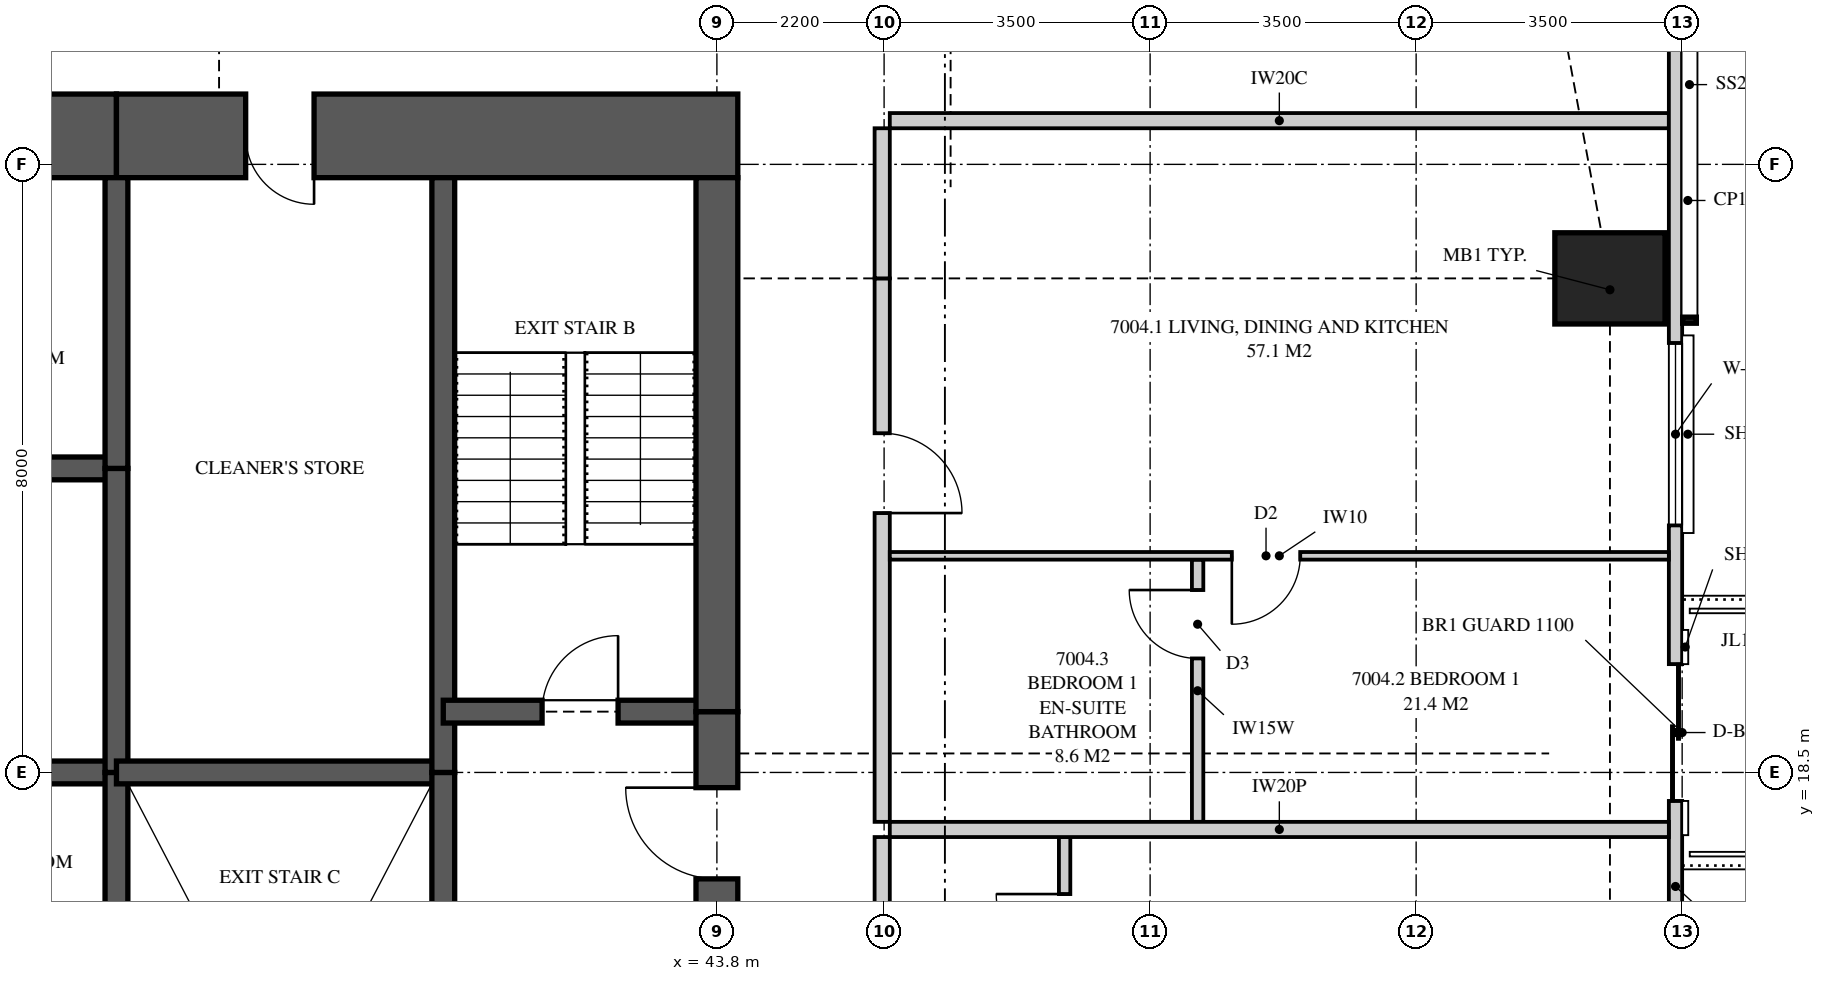
"""IFC4 building model, lengths in metres.
Left out: names, types, materials, properties, quantities, classifications, styles, units other than length and angle.
Written with IfcOpenShell. Run it as: python <this file> out.ifc"""

import sys

from ifc_helpers import new_model, si_unit, direction, frame, frame_2d, origin, origin_2d, place, context, subcontext, project, spatial, polyline, rectangle, outline, extrude, element, fill, save


model = new_model("IFC4")
c1 = context("Model", 3, precision=1e-05, world=origin(), true_north=direction((0.0, 1.0)))
c2 = subcontext(c1, "Body", "Model", "MODEL_VIEW")
j1 = project(units=[si_unit("LENGTHUNIT", "METRE"), si_unit("PLANEANGLEUNIT", "RADIAN")], contexts=[c1])
p1 = place(None, origin())
s1 = spatial("IfcSite", under=j1, at=p1, CompositionType="ELEMENT")
p2 = place(p1, origin())
s2 = spatial("IfcBuilding", under=s1, at=p2, CompositionType="ELEMENT")
p3 = place(p2, frame((0.0, 0.0, 256.45)))
s3 = spatial("IfcBuildingStorey", under=s2, at=p3, CompositionType="ELEMENT", Elevation=256.45)
p4 = place(p3, frame((55.55, 25.0, 0.0), z_axis=(0.0, 0.0, 1.0), x_axis=(1.0, 0.0, 0.0)))
e1 = element("IfcColumn", 1, at=p4, inside=s3, PredefinedType="COLUMN", context=c2, shape_type="SweptSolid", body=[
    extrude(rectangle(XDim=1.45, YDim=1.2, at=origin_2d()), origin(), (0.0, 0.0, 1.0), 3.5),
])
p5 = place(p3, frame((44.075, 26.875, 0.0), z_axis=(0.0, 0.0, 1.0), x_axis=(-1.0, 0.0, 0.0)))
e2 = element("IfcWall", 2, at=p5, inside=s3, PredefinedType="SHEAR", context=c2, shape_type="SweptSolid", body=[
    extrude(rectangle(XDim=8.175, YDim=1.1, at=frame_2d((4.087, 0.0))), origin(), (0.0, 0.0, 1.0), 3.5),
])
p6 = place(p5, frame((5.575, 0.0, 0.0)))
e3 = element("IfcOpeningElement", 3, at=p6, cuts=e2, PredefinedType="OPENING", context=c2, shape_type="SweptSolid", body=[
    extrude(rectangle(XDim=0.9, YDim=2.1, at=frame_2d((0.45, 1.05))), frame((0.0, 0.56, 0.0), z_axis=(0.0, -1.0, 0.0), x_axis=(1.0, 0.0, 0.0)), (0.0, 0.0, 1.0), 1.12),
])
p7 = place(p3, frame((35.9, 26.875, 0.0), z_axis=(0.0, 0.0, 1.0), x_axis=(-1.0, 0.0, 0.0)))
e4 = element("IfcWall", 4, at=p7, inside=s3, PredefinedType="SHEAR", context=c2, shape_type="SweptSolid", body=[
    extrude(rectangle(XDim=4.3, YDim=1.1, at=frame_2d((2.15, 0.0))), origin(), (0.0, 0.0, 1.0), 3.5),
])
p8 = place(p3, frame((43.8, 13.0, 0.0), z_axis=(0.0, 0.0, 1.0), x_axis=(0.0, 1.0, 0.0)))
e5 = element("IfcWall", 5, at=p8, inside=s3, PredefinedType="SHEAR", context=c2, shape_type="SweptSolid", body=[
    extrude(rectangle(XDim=6.3, YDim=0.55, at=frame_2d((3.15, 0.0))), origin(), (0.0, 0.0, 1.0), 3.5),
])
p9 = place(p8, frame((4.1, 0.0, 0.0)))
e6 = element("IfcOpeningElement", 6, at=p9, cuts=e5, PredefinedType="OPENING", context=c2, shape_type="SweptSolid", body=[
    extrude(rectangle(XDim=1.2, YDim=2.2, at=frame_2d((0.6, 1.1))), frame((0.0, 0.285, 0.0), z_axis=(0.0, -1.0, 0.0), x_axis=(1.0, 0.0, 0.0)), (0.0, 0.0, 1.0), 0.57),
])
p10 = place(p3, frame((43.8, 19.3, 0.0), z_axis=(0.0, 0.0, 1.0), x_axis=(0.0, 1.0, 0.0)))
e7 = element("IfcWall", 7, at=p10, inside=s3, PredefinedType="SHEAR", context=c2, shape_type="SweptSolid", body=[
    extrude(rectangle(XDim=7.025, YDim=0.55, at=frame_2d((3.512, 0.0))), origin(), (0.0, 0.0, 1.0), 3.5),
])
for number, where, z_axis, x_axis in (
    (8, (35.9, 14.5, 0.0), (0.0, 0.0, 1.0), (0.0, 1.0, 0.0)),
    (9, (35.9, 18.5, 0.0), (0.0, 0.0, 1.0), (0.0, 1.0, 0.0)),
):
    element("IfcWall", number, at=place(p3, frame(where, z_axis=z_axis, x_axis=x_axis)), inside=s3, PredefinedType="SHEAR", context=c2, shape_type="SweptSolid", body=[
        extrude(rectangle(XDim=4.0, YDim=0.3, at=frame_2d((2.0, 0.0))), origin(), (0.0, 0.0, 1.0), 3.5),
    ])
p11 = place(p3, frame((35.9, 22.5, 0.0), z_axis=(0.0, 0.0, 1.0), x_axis=(0.0, 1.0, 0.0)))
e10 = element("IfcWall", 10, at=p11, inside=s3, PredefinedType="SHEAR", context=c2, shape_type="SweptSolid", body=[
    extrude(rectangle(XDim=3.825, YDim=0.3, at=frame_2d((1.913, 0.0))), origin(), (0.0, 0.0, 1.0), 3.5),
])
p12 = place(p3, frame((40.2, 13.7, 0.0), z_axis=(0.0, 0.0, 1.0), x_axis=(0.0, 1.0, 0.0)))
e11 = element("IfcWall", 11, at=p12, inside=s3, PredefinedType="SHEAR", context=c2, shape_type="SweptSolid", body=[
    extrude(rectangle(XDim=4.8, YDim=0.3, at=frame_2d((2.4, 0.0))), origin(), (0.0, 0.0, 1.0), 3.5),
])
p13 = place(p3, frame((40.2, 18.5, 0.0), z_axis=(0.0, 0.0, 1.0), x_axis=(0.0, 1.0, 0.0)))
e12 = element("IfcWall", 12, at=p13, inside=s3, PredefinedType="SHEAR", context=c2, shape_type="SweptSolid", body=[
    extrude(rectangle(XDim=7.825, YDim=0.3, at=frame_2d((3.913, 0.0))), origin(), (0.0, 0.0, 1.0), 3.5),
])
for number, where, z_axis, x_axis in (
    (13, (31.6, 18.5, 0.0), (0.0, 0.0, 1.0), (1.0, 0.0, 0.0)),
    (14, (31.6, 22.5, 0.0), (0.0, 0.0, 1.0), (1.0, 0.0, 0.0)),
):
    element("IfcWall", number, at=place(p3, frame(where, z_axis=z_axis, x_axis=x_axis)), inside=s3, PredefinedType="SHEAR", context=c2, shape_type="SweptSolid", body=[
        extrude(rectangle(XDim=4.3, YDim=0.3, at=frame_2d((2.15, 0.0))), origin(), (0.0, 0.0, 1.0), 3.5),
    ])
p14 = place(p3, frame((35.9, 18.5, 0.0), z_axis=(0.0, 0.0, 1.0), x_axis=(1.0, 0.0, 0.0)))
e15 = element("IfcWall", 15, at=p14, inside=s3, PredefinedType="SHEAR", context=c2, shape_type="SweptSolid", body=[
    extrude(rectangle(XDim=4.3, YDim=0.3, at=frame_2d((2.15, 0.0))), origin(), (0.0, 0.0, 1.0), 3.5),
])
p15 = place(p3, frame((40.2, 19.3, 0.0), z_axis=(0.0, 0.0, 1.0), x_axis=(1.0, 0.0, 0.0)))
e16 = element("IfcWall", 16, at=p15, inside=s3, PredefinedType="SHEAR", context=c2, shape_type="SweptSolid", body=[
    extrude(rectangle(XDim=3.6, YDim=0.3, at=frame_2d((1.8, 0.0))), origin(), (0.0, 0.0, 1.0), 3.5),
])
p16 = place(p15, frame((1.3, 0.0, 0.0)))
e17 = element("IfcOpeningElement", 17, at=p16, cuts=e16, PredefinedType="OPENING", context=c2, shape_type="SweptSolid", body=[
    extrude(rectangle(XDim=1.0, YDim=2.1, at=frame_2d((0.5, 1.05))), frame((0.0, 0.16, 0.0), z_axis=(0.0, -1.0, 0.0), x_axis=(1.0, 0.0, 0.0)), (0.0, 0.0, 1.0), 0.32),
])
p17 = place(p3, frame((56.413, 3.051, 0.0), z_axis=(0.0, 0.0, 1.0), x_axis=(0.0, 1.0, 0.0)))
e18 = element("IfcWall", 18, at=p17, inside=s3, PredefinedType="SOLIDWALL", context=c2, shape_type="SweptSolid", body=[
    extrude(outline(polyline([(0.0, 0.0), (27.897, 0.0), (27.897, 3.26), (22.157, 3.26), (22.157, 2.3), (22.092, 2.3), (22.092, 3.26), (21.949, 3.26), (21.949, 2.3), (9.949, 2.3), (9.949, 3.26), (9.858, 3.26), (9.858, 2.3), (9.688, 2.3), (9.688, 3.26), (0.0, 3.26), (0.0, 0.0)])), frame((0.0, 0.087, 0.0), z_axis=(0.0, -1.0, 0.0), x_axis=(1.0, 0.0, 0.0)), (0.0, 0.0, 1.0), 0.175),
])
p18 = place(p17, frame((10.831, 0.0, 0.4)))
e19 = element("IfcOpeningElement", 19, at=p18, cuts=e18, PredefinedType="OPENING", context=c2, shape_type="SweptSolid", body=[
    extrude(rectangle(XDim=2.4, YDim=1.85, at=frame_2d((1.2, 0.925))), frame((0.0, 0.097, 0.0), z_axis=(0.0, -1.0, 0.0), x_axis=(1.0, 0.0, 0.0)), (0.0, 0.0, 1.0), 0.195),
])
p19 = place(p17, frame((15.074, 0.0, 0.0)))
e20 = element("IfcOpeningElement", 20, at=p19, cuts=e18, PredefinedType="OPENING", context=c2, shape_type="SweptSolid", body=[
    extrude(rectangle(XDim=1.8, YDim=2.25, at=frame_2d((0.9, 1.125))), frame((0.0, 0.097, 0.0), z_axis=(0.0, -1.0, 0.0), x_axis=(1.0, 0.0, 0.0)), (0.0, 0.0, 1.0), 0.195),
])
p20 = place(p17, frame((18.699, 0.0, 0.4)))
e21 = element("IfcOpeningElement", 21, at=p20, cuts=e18, PredefinedType="OPENING", context=c2, shape_type="SweptSolid", body=[
    extrude(rectangle(XDim=2.4, YDim=1.85, at=frame_2d((1.2, 0.925))), frame((0.0, 0.097, 0.0), z_axis=(0.0, -1.0, 0.0), x_axis=(1.0, 0.0, 0.0)), (0.0, 0.0, 1.0), 0.195),
])
p21 = place(p3, frame((46.075, 27.075, 0.0), z_axis=(0.0, 0.0, 1.0), x_axis=(1.0, 0.0, 0.0)))
e22 = element("IfcWall", 22, at=p21, inside=s3, PredefinedType="PARTITIONING", context=c2, shape_type="SweptSolid", body=[
    extrude(outline(polyline([(0.0, 0.0), (10.25, 0.0), (10.25, 3.26), (10.017, 3.26), (10.017, 2.3), (8.166, 2.3), (8.166, 3.26), (2.11, 3.26), (2.11, 2.66), (0.0, 2.66), (0.0, 3.26), (0.0, 0.0)])), frame((0.0, 0.1, 0.0), z_axis=(0.0, -1.0, 0.0), x_axis=(1.0, 0.0, 0.0)), (0.0, 0.0, 1.0), 0.2),
])
p22 = place(p3, frame((56.325, 17.75, 0.0), z_axis=(0.0, 0.0, 1.0), x_axis=(-1.0, 0.0, 0.0)))
e23 = element("IfcWall", 23, at=p22, inside=s3, PredefinedType="PARTITIONING", context=c2, shape_type="SweptSolid", body=[
    extrude(outline(polyline([(0.0, 0.0), (10.25, 0.0), (10.25, 3.26), (10.25, 2.66), (1.685, 2.66), (1.685, 2.3), (0.0, 2.3), (0.0, 3.26), (0.0, 0.0)])), frame((0.0, 0.1, 0.0), z_axis=(0.0, -1.0, 0.0), x_axis=(1.0, 0.0, 0.0)), (0.0, 0.0, 1.0), 0.2),
])
p23 = place(p3, frame((45.975, 13.0, 0.0), z_axis=(0.0, 0.0, 1.0), x_axis=(0.0, 1.0, 0.0)))
e24 = element("IfcWall", 24, at=p23, inside=s3, PredefinedType="PARTITIONING", context=c2, shape_type="SweptSolid", body=[
    extrude(outline(polyline([(0.0, 0.0), (4.65, 0.0), (4.65, 2.66), (4.44, 2.66), (4.44, 3.26), (1.31, 3.26), (1.31, 2.66), (0.0, 2.66), (0.0, 0.0)])), frame((0.0, 0.1, 0.0), z_axis=(0.0, -1.0, 0.0), x_axis=(1.0, 0.0, 0.0)), (0.0, 0.0, 1.0), 0.2),
])
p24 = place(p23, frame((0.337, 0.0, 0.0)))
e25 = element("IfcOpeningElement", 25, at=p24, cuts=e24, PredefinedType="OPENING", context=c2, shape_type="SweptSolid", body=[
    extrude(rectangle(XDim=1.05, YDim=2.2, at=frame_2d((0.525, 1.1))), frame((0.0, 0.11, 0.0), z_axis=(0.0, -1.0, 0.0), x_axis=(1.0, 0.0, 0.0)), (0.0, 0.0, 1.0), 0.22),
])
p25 = place(p3, frame((48.375, 15.225, 0.0), z_axis=(0.0, 0.0, 1.0), x_axis=(0.0, 1.0, 0.0)))
e26 = element("IfcWall", 26, at=p25, inside=s3, PredefinedType="PLUMBINGWALL", context=c2, shape_type="SweptSolid", body=[
    extrude(outline(polyline([(0.0, 0.0), (2.425, 0.0), (2.425, 3.26), (2.425, 2.66), (2.24, 2.66), (2.24, 3.26), (0.0, 3.26), (0.0, 0.0)])), frame((0.0, 0.075, 0.0), z_axis=(0.0, -1.0, 0.0), x_axis=(1.0, 0.0, 0.0)), (0.0, 0.0, 1.0), 0.15),
])
p26 = place(p25, frame((0.775, 0.0, 0.0)))
e27 = element("IfcOpeningElement", 27, at=p26, cuts=e26, PredefinedType="OPENING", context=c2, shape_type="SweptSolid", body=[
    extrude(rectangle(XDim=0.9, YDim=2.1, at=frame_2d((0.45, 1.05))), frame((0.0, 0.085, 0.0), z_axis=(0.0, -1.0, 0.0), x_axis=(1.0, 0.0, 0.0)), (0.0, 0.0, 1.0), 0.17),
])
p27 = place(p3, frame((45.975, 17.85, 0.0), z_axis=(0.0, 0.0, 1.0), x_axis=(0.0, 1.0, 0.0)))
e28 = element("IfcWall", 28, at=p27, inside=s3, PredefinedType="PARTITIONING", context=c2, shape_type="SweptSolid", body=[
    extrude(outline(polyline([(0.0, 0.0), (7.15, 0.0), (7.15, 2.66), (5.84, 2.66), (5.84, 3.26), (2.21, 3.26), (2.21, 2.66), (0.0, 2.66), (0.0, 0.0)])), frame((0.0, 0.1, 0.0), z_axis=(0.0, -1.0, 0.0), x_axis=(1.0, 0.0, 0.0)), (0.0, 0.0, 1.0), 0.2),
])
p28 = place(p27, frame((4.062, 0.0, 0.0)))
e29 = element("IfcOpeningElement", 29, at=p28, cuts=e28, PredefinedType="OPENING", context=c2, shape_type="SweptSolid", body=[
    extrude(rectangle(XDim=1.05, YDim=2.2, at=frame_2d((0.525, 1.1))), frame((0.0, 0.11, 0.0), z_axis=(0.0, -1.0, 0.0), x_axis=(1.0, 0.0, 0.0)), (0.0, 0.0, 1.0), 0.22),
])
p29 = place(p3, frame((45.975, 25.0, 0.0), z_axis=(0.0, 0.0, 1.0), x_axis=(0.0, 1.0, 0.0)))
e30 = element("IfcWall", 30, at=p29, inside=s3, PredefinedType="PARTITIONING", context=c2, shape_type="SweptSolid", body=[
    extrude(rectangle(XDim=1.975, YDim=0.2, at=frame_2d((0.988, 0.0))), origin(), (0.0, 0.0, 1.0), 2.66),
])
p30 = place(p3, frame((56.325, 21.35, 0.0), z_axis=(0.0, 0.0, 1.0), x_axis=(-1.0, 0.0, 0.0)))
e31 = element("IfcWall", 31, at=p30, inside=s3, PredefinedType="PARTITIONING", context=c2, shape_type="SweptSolid", body=[
    extrude(outline(polyline([(0.0, 0.0), (10.25, 0.0), (10.25, 3.26), (1.635, 3.26), (1.635, 2.3), (0.0, 2.3), (0.0, 3.26), (0.0, 0.0)])), frame((0.0, 0.05, 0.0), z_axis=(0.0, -1.0, 0.0), x_axis=(1.0, 0.0, 0.0)), (0.0, 0.0, 1.0), 0.1),
])
p31 = place(p30, frame((4.85, 0.0, 0.0)))
e32 = element("IfcOpeningElement", 32, at=p31, cuts=e31, PredefinedType="OPENING", context=c2, shape_type="SweptSolid", body=[
    extrude(rectangle(XDim=0.9, YDim=2.1, at=frame_2d((0.45, 1.05))), frame((0.0, 0.06, 0.0), z_axis=(0.0, -1.0, 0.0), x_axis=(1.0, 0.0, 0.0)), (0.0, 0.0, 1.0), 0.12),
])
p32 = place(p3, frame((50.125, 17.85, 0.0), z_axis=(0.0, 0.0, 1.0), x_axis=(0.0, 1.0, 0.0)))
e33 = element("IfcWall", 33, at=p32, inside=s3, PredefinedType="PLUMBINGWALL", context=c2, shape_type="SweptSolid", body=[
    extrude(outline(polyline([(0.0, 0.0), (3.45, 0.0), (3.45, 3.26), (2.185, 3.26), (2.185, 2.66), (0.0, 2.66), (0.0, 3.26), (0.0, 0.0)])), frame((0.0, 0.075, 0.0), z_axis=(0.0, -1.0, 0.0), x_axis=(1.0, 0.0, 0.0)), (0.0, 0.0, 1.0), 0.15),
])
p33 = place(p32, frame((2.15, 0.0, 0.0)))
e34 = element("IfcOpeningElement", 34, at=p33, cuts=e33, PredefinedType="OPENING", context=c2, shape_type="SweptSolid", body=[
    extrude(rectangle(XDim=0.9, YDim=2.1, at=frame_2d((0.45, 1.05))), frame((0.0, 0.085, 0.0), z_axis=(0.0, -1.0, 0.0), x_axis=(1.0, 0.0, 0.0)), (0.0, 0.0, 1.0), 0.17),
])
p34 = place(p19, origin())
e35 = element("IfcDoor", 35, at=p34, inside=s3, OperationType="SLIDING_TO_LEFT", PredefinedType="DOOR", context=c2, shape_type="SweptSolid", body=[
    extrude(rectangle(XDim=1.8, YDim=2.25, at=frame_2d((0.9, 1.125))), frame((0.0, 0.025, 0.0), z_axis=(0.0, -1.0, 0.0), x_axis=(1.0, 0.0, 0.0)), (0.0, 0.0, 1.0), 0.05),
])
fill(e20, e35)
p35 = place(p20, origin())
e36 = element("IfcWindow", 36, at=p35, inside=s3, PartitioningType="SINGLE_PANEL", PredefinedType="WINDOW", context=c2, shape_type="SweptSolid", body=[
    extrude(rectangle(XDim=2.4, YDim=1.85, at=frame_2d((1.2, 0.925))), frame((0.0, 0.03, 0.0), z_axis=(0.0, -1.0, 0.0), x_axis=(1.0, 0.0, 0.0)), (0.0, 0.0, 1.0), 0.06),
])
fill(e21, e36)
p36 = place(p26, origin())
e37 = element("IfcDoor", 37, at=p36, inside=s3, OperationType="SINGLE_SWING_RIGHT", PredefinedType="DOOR", context=c2, shape_type="SweptSolid", body=[
    extrude(rectangle(XDim=0.9, YDim=2.1, at=frame_2d((0.45, 1.05))), frame((0.0, 0.025, 0.0), z_axis=(0.0, -1.0, 0.0), x_axis=(1.0, 0.0, 0.0)), (0.0, 0.0, 1.0), 0.05),
])
fill(e27, e37)
p37 = place(p28, frame((1.05, 0.0, 0.0), z_axis=(0.0, 0.0, 1.0), x_axis=(-1.0, 0.0, 0.0)))
e38 = element("IfcDoor", 38, at=p37, inside=s3, OperationType="SINGLE_SWING_RIGHT", PredefinedType="DOOR", context=c2, shape_type="SweptSolid", body=[
    extrude(rectangle(XDim=1.05, YDim=2.2, at=frame_2d((0.525, 1.1))), frame((0.0, 0.025, 0.0), z_axis=(0.0, -1.0, 0.0), x_axis=(1.0, 0.0, 0.0)), (0.0, 0.0, 1.0), 0.05),
])
fill(e29, e38)
p38 = place(p31, origin())
e39 = element("IfcDoor", 39, at=p38, inside=s3, OperationType="SINGLE_SWING_RIGHT", PredefinedType="DOOR", context=c2, shape_type="SweptSolid", body=[
    extrude(rectangle(XDim=0.9, YDim=2.1, at=frame_2d((0.45, 1.05))), frame((0.0, 0.025, 0.0), z_axis=(0.0, -1.0, 0.0), x_axis=(1.0, 0.0, 0.0)), (0.0, 0.0, 1.0), 0.05),
])
fill(e32, e39)
p39 = place(p33, origin())
e40 = element("IfcDoor", 40, at=p39, inside=s3, OperationType="SINGLE_SWING_RIGHT", PredefinedType="DOOR", context=c2, shape_type="SweptSolid", body=[
    extrude(rectangle(XDim=0.9, YDim=2.1, at=frame_2d((0.45, 1.05))), frame((0.0, 0.025, 0.0), z_axis=(0.0, -1.0, 0.0), x_axis=(1.0, 0.0, 0.0)), (0.0, 0.0, 1.0), 0.05),
])
fill(e34, e40)
p40 = place(p16, origin())
e41 = element("IfcDoor", 41, at=p40, inside=s3, OperationType="SINGLE_SWING_RIGHT", PredefinedType="DOOR", context=c2, shape_type="SweptSolid", body=[
    extrude(rectangle(XDim=1.0, YDim=2.1, at=frame_2d((0.5, 1.05))), frame((0.0, 0.025, 0.0), z_axis=(0.0, -1.0, 0.0), x_axis=(1.0, 0.0, 0.0)), (0.0, 0.0, 1.0), 0.05),
])
fill(e17, e41)
p41 = place(p9, origin())
e42 = element("IfcDoor", 42, at=p41, inside=s3, OperationType="SINGLE_SWING_RIGHT", PredefinedType="DOOR", context=c2, shape_type="SweptSolid", body=[
    extrude(rectangle(XDim=1.2, YDim=2.2, at=frame_2d((0.6, 1.1))), frame((0.0, 0.025, 0.0), z_axis=(0.0, -1.0, 0.0), x_axis=(1.0, 0.0, 0.0)), (0.0, 0.0, 1.0), 0.05),
])
fill(e6, e42)
p42 = place(p6, origin())
e43 = element("IfcDoor", 43, at=p42, inside=s3, OperationType="SINGLE_SWING_LEFT", PredefinedType="DOOR", context=c2, shape_type="SweptSolid", body=[
    extrude(rectangle(XDim=0.9, YDim=2.1, at=frame_2d((0.45, 1.05))), frame((0.0, 0.47, 0.0), z_axis=(0.0, -1.0, 0.0), x_axis=(1.0, 0.0, 0.0)), (0.0, 0.0, 1.0), 0.8),
])
fill(e3, e43)
save(model, sys.argv[1])
